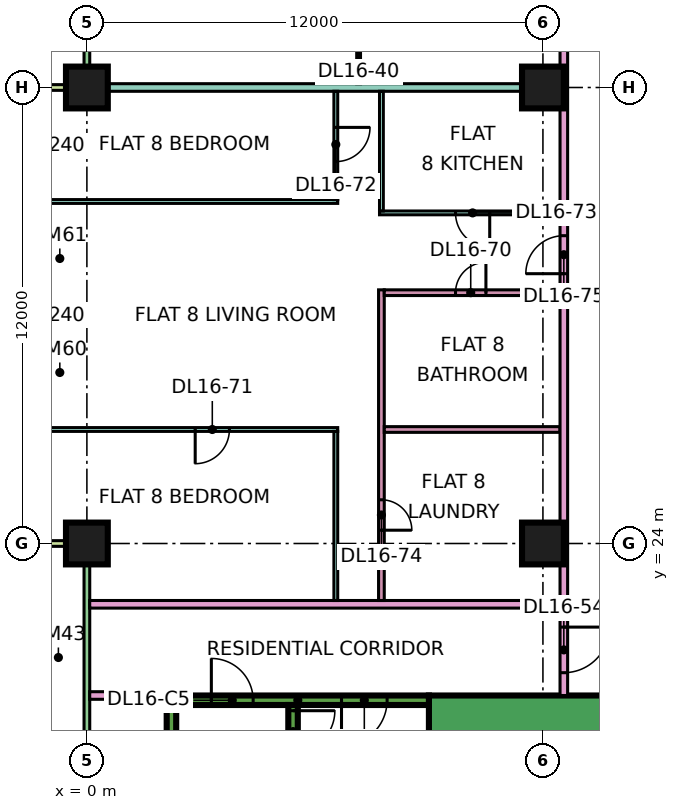
"""IFC4 building model, lengths in metres.
Left out: names, types, materials, properties, quantities, classifications, styles, units other than length and angle.
Written with IfcOpenShell. Run it as: python <this file> out.ifc"""

import sys

from ifc_helpers import new_model, si_unit, direction, frame, frame_2d, origin, origin_2d, place, context, subcontext, project, spatial, rectangle, extrude, element, fill, save


model = new_model("IFC4")
c1 = context("Model", 3, precision=1e-05, world=origin(), true_north=direction((0.0, 1.0)))
c2 = subcontext(c1, "Body", "Model", "MODEL_VIEW")
j1 = project(units=[si_unit("LENGTHUNIT", "METRE"), si_unit("PLANEANGLEUNIT", "RADIAN")], contexts=[c1])
p1 = place(None, origin())
s1 = spatial("IfcSite", under=j1, at=p1, CompositionType="ELEMENT")
p2 = place(p1, origin())
s2 = spatial("IfcBuilding", under=s1, at=p2, CompositionType="ELEMENT")
p3 = place(p2, frame((0.0, 0.0, 75.15)))
s3 = spatial("IfcBuildingStorey", under=s2, at=p3, CompositionType="ELEMENT", Elevation=75.15)
p4 = place(p3, frame((0.0, 24.0, 0.0), z_axis=(0.0, 0.0, 1.0), x_axis=(1.0, 0.0, 0.0)))
e1 = element("IfcColumn", 1, at=p4, inside=s3, PredefinedType="COLUMN", context=c2, shape_type="SweptSolid", body=[
    extrude(rectangle(XDim=1.1, YDim=1.1, at=origin_2d()), origin(), (0.0, 0.0, 1.0), 3.75),
])
p5 = place(p3, frame((0.0, 36.0, 0.0), z_axis=(0.0, 0.0, 1.0), x_axis=(1.0, 0.0, 0.0)))
e2 = element("IfcColumn", 2, at=p5, inside=s3, PredefinedType="COLUMN", context=c2, shape_type="SweptSolid", body=[
    extrude(rectangle(XDim=1.1, YDim=1.1, at=origin_2d()), origin(), (0.0, 0.0, 1.0), 3.75),
])
for number, where, z_axis, x_axis in (
    (3, (12.0, 24.0, 0.0), (0.0, 0.0, 1.0), (1.0, 0.0, 0.0)),
    (4, (12.0, 36.0, 0.0), (0.0, 0.0, 1.0), (1.0, 0.0, 0.0)),
):
    element("IfcColumn", number, at=place(p3, frame(where, z_axis=z_axis, x_axis=x_axis)), inside=s3, PredefinedType="COLUMN", context=c2, shape_type="SweptSolid", body=[
        extrude(rectangle(XDim=1.1, YDim=1.1, at=origin_2d()), origin(), (0.0, 0.0, 1.0), 3.75),
    ])
p6 = place(p3, frame((9.0, 19.45, 0.0), z_axis=(0.0, 0.0, 1.0), x_axis=(1.0, 0.0, 0.0)))
e5 = element("IfcWall", 5, at=p6, inside=s3, PredefinedType="SHEAR", context=c2, shape_type="SweptSolid", body=[
    extrude(rectangle(XDim=25.0, YDim=1.1, at=frame_2d((12.5, 0.0))), origin(), (0.0, 0.0, 1.0), 3.75),
])
p7 = place(p6, frame((19.1, 0.0, 0.0)))
e6 = element("IfcOpeningElement", 6, at=p7, cuts=e5, PredefinedType="OPENING", context=c2, shape_type="SweptSolid", body=[
    extrude(rectangle(XDim=1.8, YDim=2.4, at=frame_2d((0.9, 1.2))), frame((0.0, 0.56, 0.0), z_axis=(0.0, -1.0, 0.0), x_axis=(1.0, 0.0, 0.0)), (0.0, 0.0, 1.0), 1.12),
])
p8 = place(p3, frame((2.1, 19.875, 0.0), z_axis=(0.0, 0.0, 1.0), x_axis=(1.0, 0.0, 0.0)))
e7 = element("IfcWall", 7, at=p8, inside=s3, PredefinedType="SHEAR", context=c2, shape_type="SweptSolid", body=[
    extrude(rectangle(XDim=6.9, YDim=0.25, at=frame_2d((3.45, 0.0))), origin(), (0.0, 0.0, 1.0), 3.75),
])
p9 = place(p8, frame((1.175, 0.0, 0.0)))
e8 = element("IfcOpeningElement", 8, at=p9, cuts=e7, PredefinedType="OPENING", context=c2, shape_type="SweptSolid", body=[
    extrude(rectangle(XDim=1.1, YDim=2.2, at=frame_2d((0.55, 1.1))), frame((0.0, 0.135, 0.0), z_axis=(0.0, -1.0, 0.0), x_axis=(1.0, 0.0, 0.0)), (0.0, 0.0, 1.0), 0.27),
])
p10 = place(p8, frame((4.6, 0.0, 0.0)))
e9 = element("IfcOpeningElement", 9, at=p10, cuts=e7, PredefinedType="OPENING", context=c2, shape_type="SweptSolid", body=[
    extrude(rectangle(XDim=1.2, YDim=2.2, at=frame_2d((0.6, 1.1))), frame((0.0, 0.135, 0.0), z_axis=(0.0, -1.0, 0.0), x_axis=(1.0, 0.0, 0.0)), (0.0, 0.0, 1.0), 0.27),
])
p11 = place(p3, frame((2.225, 13.25, 0.0), z_axis=(0.0, 0.0, 1.0), x_axis=(0.0, 1.0, 0.0)))
e10 = element("IfcWall", 10, at=p11, inside=s3, PredefinedType="SHEAR", context=c2, shape_type="SweptSolid", body=[
    extrude(rectangle(XDim=6.5, YDim=0.25, at=frame_2d((3.25, 0.0))), origin(), (0.0, 0.0, 1.0), 3.75),
])
p12 = place(p3, frame((5.425, 13.25, 0.0), z_axis=(0.0, 0.0, 1.0), x_axis=(0.0, 1.0, 0.0)))
e11 = element("IfcWall", 11, at=p12, inside=s3, PredefinedType="SHEAR", context=c2, shape_type="SweptSolid", body=[
    extrude(rectangle(XDim=6.5, YDim=0.25, at=frame_2d((3.25, 0.0))), origin(), (0.0, 0.0, 1.0), 3.75),
])
p13 = place(p12, frame((5.25, 0.0, 0.0)))
e12 = element("IfcOpeningElement", 12, at=p13, cuts=e11, PredefinedType="OPENING", context=c2, shape_type="SweptSolid", body=[
    extrude(rectangle(XDim=1.1, YDim=2.2, at=frame_2d((0.55, 1.1))), frame((0.0, 0.135, 0.0), z_axis=(0.0, -1.0, 0.0), x_axis=(1.0, 0.0, 0.0)), (0.0, 0.0, 1.0), 0.27),
])
p14 = place(p3, frame((0.0, 47.925, 0.0), z_axis=(0.0, 0.0, 1.0), x_axis=(0.0, -1.0, 0.0)))
e13 = element("IfcWall", 13, at=p14, inside=s3, PredefinedType="SOLIDWALL", context=c2, shape_type="SweptSolid", body=[
    extrude(rectangle(XDim=11.85, YDim=0.15, at=frame_2d((5.925, 0.0))), origin(), (0.0, 0.0, 1.0), 3.35),
])
p15 = place(p14, frame((0.538, 0.0, 0.45)))
e14 = element("IfcOpeningElement", 14, at=p15, cuts=e13, PredefinedType="OPENING", context=c2, shape_type="SweptSolid", body=[
    extrude(rectangle(XDim=1.2, YDim=2.4, at=frame_2d((0.6, 1.2))), frame((0.0, 0.085, 0.0), z_axis=(0.0, -1.0, 0.0), x_axis=(1.0, 0.0, 0.0)), (0.0, 0.0, 1.0), 0.17),
])
p16 = place(p14, frame((4.15, 0.0, 0.45)))
e15 = element("IfcOpeningElement", 15, at=p16, cuts=e13, PredefinedType="OPENING", context=c2, shape_type="SweptSolid", body=[
    extrude(rectangle(XDim=1.2, YDim=2.4, at=frame_2d((0.6, 1.2))), frame((0.0, 0.085, 0.0), z_axis=(0.0, -1.0, 0.0), x_axis=(1.0, 0.0, 0.0)), (0.0, 0.0, 1.0), 0.17),
])
p17 = place(p14, frame((6.525, 0.0, 0.0)))
e16 = element("IfcOpeningElement", 16, at=p17, cuts=e13, PredefinedType="OPENING", context=c2, shape_type="SweptSolid", body=[
    extrude(rectangle(XDim=1.8, YDim=2.4, at=frame_2d((0.9, 1.2))), frame((0.0, 0.085, 0.0), z_axis=(0.0, -1.0, 0.0), x_axis=(1.0, 0.0, 0.0)), (0.0, 0.0, 1.0), 0.17),
])
p18 = place(p14, frame((9.5, 0.0, 0.45)))
e17 = element("IfcOpeningElement", 17, at=p18, cuts=e13, PredefinedType="OPENING", context=c2, shape_type="SweptSolid", body=[
    extrude(rectangle(XDim=1.2, YDim=2.4, at=frame_2d((0.6, 1.2))), frame((0.0, 0.085, 0.0), z_axis=(0.0, -1.0, 0.0), x_axis=(1.0, 0.0, 0.0)), (0.0, 0.0, 1.0), 0.17),
])
p19 = place(p3, frame((-1.5, 36.0, 0.0), z_axis=(0.0, 0.0, 1.0), x_axis=(1.0, 0.0, 0.0)))
e18 = element("IfcWall", 18, at=p19, inside=s3, PredefinedType="SOLIDWALL", context=c2, shape_type="SweptSolid", body=[
    extrude(rectangle(XDim=1.5, YDim=0.15, at=frame_2d((0.75, 0.0))), origin(), (0.0, 0.0, 1.0), 3.35),
])
p20 = place(p3, frame((0.0, 23.925, 0.0), z_axis=(0.0, 0.0, 1.0), x_axis=(0.0, -1.0, 0.0)))
e19 = element("IfcWall", 19, at=p20, inside=s3, PredefinedType="SOLIDWALL", context=c2, shape_type="SweptSolid", body=[
    extrude(rectangle(XDim=11.35, YDim=0.15, at=frame_2d((5.675, 0.0))), origin(), (0.0, 0.0, 1.0), 3.35),
])
p21 = place(p20, frame((6.738, 0.0, 0.0)))
e20 = element("IfcOpeningElement", 20, at=p21, cuts=e19, PredefinedType="OPENING", context=c2, shape_type="SweptSolid", body=[
    extrude(rectangle(XDim=1.8, YDim=2.4, at=frame_2d((0.9, 1.2))), frame((0.0, 0.085, 0.0), z_axis=(0.0, -1.0, 0.0), x_axis=(1.0, 0.0, 0.0)), (0.0, 0.0, 1.0), 0.17),
])
p22 = place(p3, frame((-1.5, 24.0, 0.0), z_axis=(0.0, 0.0, 1.0), x_axis=(1.0, 0.0, 0.0)))
e21 = element("IfcWall", 21, at=p22, inside=s3, PredefinedType="SOLIDWALL", context=c2, shape_type="SweptSolid", body=[
    extrude(rectangle(XDim=1.5, YDim=0.15, at=frame_2d((0.75, 0.0))), origin(), (0.0, 0.0, 1.0), 3.35),
])
p23 = place(p3, frame((-1.35, 27.0, 0.0), z_axis=(0.0, 0.0, 1.0), x_axis=(1.0, 0.0, 0.0)))
e22 = element("IfcWall", 22, at=p23, inside=s3, PredefinedType="PARTITIONING", context=c2, shape_type="SweptSolid", body=[
    extrude(rectangle(XDim=7.95, YDim=0.1, at=frame_2d((3.975, 0.0))), origin(), (0.0, 0.0, 1.0), 3.35),
])
p24 = place(p23, frame((4.2, 0.0, 0.0)))
e23 = element("IfcOpeningElement", 23, at=p24, cuts=e22, PredefinedType="OPENING", context=c2, shape_type="SweptSolid", body=[
    extrude(rectangle(XDim=0.9, YDim=2.1, at=frame_2d((0.45, 1.05))), frame((0.0, 0.06, 0.0), z_axis=(0.0, -1.0, 0.0), x_axis=(1.0, 0.0, 0.0)), (0.0, 0.0, 1.0), 0.12),
])
p25 = place(p3, frame((-1.35, 33.0, 0.0), z_axis=(0.0, 0.0, 1.0), x_axis=(1.0, 0.0, 0.0)))
e24 = element("IfcWall", 24, at=p25, inside=s3, PredefinedType="PARTITIONING", context=c2, shape_type="SweptSolid", body=[
    extrude(rectangle(XDim=7.95, YDim=0.1, at=frame_2d((3.975, 0.0))), origin(), (0.0, 0.0, 1.0), 3.35),
])
e25 = element("IfcWall", 25, at=p5, inside=s3, PredefinedType="PARTITIONING", context=c2, shape_type="SweptSolid", body=[
    extrude(rectangle(XDim=12.45, YDim=0.2, at=frame_2d((6.225, 0.0))), origin(), (0.0, 0.0, 1.0), 3.35),
])
p26 = place(p3, frame((0.074, 20.0, 0.0), z_axis=(0.0, 0.0, 1.0), x_axis=(1.0, 0.0, 0.0)))
e26 = element("IfcWall", 26, at=p26, inside=s3, PredefinedType="PARTITIONING", context=c2, shape_type="SweptSolid", body=[
    extrude(rectangle(XDim=2.026, YDim=0.2, at=frame_2d((1.013, 0.0))), origin(), (0.0, 0.0, 1.0), 3.35),
])
p27 = place(p3, frame((0.074, 22.4, 0.0), z_axis=(0.0, 0.0, 1.0), x_axis=(1.0, 0.0, 0.0)))
e27 = element("IfcWall", 27, at=p27, inside=s3, PredefinedType="PARTITIONING", context=c2, shape_type="SweptSolid", body=[
    extrude(rectangle(XDim=12.376, YDim=0.2, at=frame_2d((6.188, 0.0))), origin(), (0.0, 0.0, 1.0), 3.35),
])
p28 = place(p3, frame((6.55, 22.5, 0.0), z_axis=(0.0, 0.0, 1.0), x_axis=(0.0, 1.0, 0.0)))
e28 = element("IfcWall", 28, at=p28, inside=s3, PredefinedType="PARTITIONING", context=c2, shape_type="SweptSolid", body=[
    extrude(rectangle(XDim=4.45, YDim=0.1, at=frame_2d((2.225, 0.0))), origin(), (0.0, 0.0, 1.0), 3.35),
])
p29 = place(p3, frame((6.55, 33.05, 0.0), z_axis=(0.0, 0.0, 1.0), x_axis=(0.0, 1.0, 0.0)))
e29 = element("IfcWall", 29, at=p29, inside=s3, PredefinedType="PARTITIONING", context=c2, shape_type="SweptSolid", body=[
    extrude(rectangle(XDim=2.85, YDim=0.1, at=frame_2d((1.425, 0.0))), origin(), (0.0, 0.0, 1.0), 3.35),
])
p30 = place(p29, frame((1.0, 0.0, 0.0)))
e30 = element("IfcOpeningElement", 30, at=p30, cuts=e29, PredefinedType="OPENING", context=c2, shape_type="SweptSolid", body=[
    extrude(rectangle(XDim=0.9, YDim=2.1, at=frame_2d((0.45, 1.05))), frame((0.0, 0.06, 0.0), z_axis=(0.0, -1.0, 0.0), x_axis=(1.0, 0.0, 0.0)), (0.0, 0.0, 1.0), 0.12),
])
p31 = place(p3, frame((7.15, 36.1, 0.0), z_axis=(0.0, 0.0, 1.0), x_axis=(0.0, 1.0, 0.0)))
e31 = element("IfcWall", 31, at=p31, inside=s3, PredefinedType="PARTITIONING", context=c2, shape_type="SweptSolid", body=[
    extrude(rectangle(XDim=2.85, YDim=0.1, at=frame_2d((1.425, 0.0))), origin(), (0.0, 0.0, 1.0), 3.35),
])
p32 = place(p31, frame((0.95, 0.0, 0.0)))
e32 = element("IfcOpeningElement", 32, at=p32, cuts=e31, PredefinedType="OPENING", context=c2, shape_type="SweptSolid", body=[
    extrude(rectangle(XDim=0.9, YDim=2.1, at=frame_2d((0.45, 1.05))), frame((0.0, 0.06, 0.0), z_axis=(0.0, -1.0, 0.0), x_axis=(1.0, 0.0, 0.0)), (0.0, 0.0, 1.0), 0.12),
])
p33 = place(p3, frame((7.7, 32.7, 0.0), z_axis=(0.0, 0.0, 1.0), x_axis=(1.0, 0.0, 0.0)))
e33 = element("IfcWall", 33, at=p33, inside=s3, PredefinedType="PARTITIONING", context=c2, shape_type="SweptSolid", body=[
    extrude(rectangle(XDim=4.75, YDim=0.1, at=frame_2d((2.375, 0.0))), origin(), (0.0, 0.0, 1.0), 3.35),
])
p34 = place(p33, frame((2.0, 0.0, 0.0)))
e34 = element("IfcOpeningElement", 34, at=p34, cuts=e33, PredefinedType="OPENING", context=c2, shape_type="SweptSolid", body=[
    extrude(rectangle(XDim=0.9, YDim=2.1, at=frame_2d((0.45, 1.05))), frame((0.0, 0.06, 0.0), z_axis=(0.0, -1.0, 0.0), x_axis=(1.0, 0.0, 0.0)), (0.0, 0.0, 1.0), 0.12),
])
p35 = place(p3, frame((7.75, 22.5, 0.0), z_axis=(0.0, 0.0, 1.0), x_axis=(0.0, 1.0, 0.0)))
e35 = element("IfcWall", 35, at=p35, inside=s3, PredefinedType="PARTITIONING", context=c2, shape_type="SweptSolid", body=[
    extrude(rectangle(XDim=8.175, YDim=0.15, at=frame_2d((4.087, 0.0))), origin(), (0.0, 0.0, 1.0), 3.35),
])
p36 = place(p35, frame((1.85, 0.0, 0.0)))
e36 = element("IfcOpeningElement", 36, at=p36, cuts=e35, PredefinedType="OPENING", context=c2, shape_type="SweptSolid", body=[
    extrude(rectangle(XDim=0.8, YDim=2.1, at=frame_2d((0.4, 1.05))), frame((0.0, 0.085, 0.0), z_axis=(0.0, -1.0, 0.0), x_axis=(1.0, 0.0, 0.0)), (0.0, 0.0, 1.0), 0.17),
])
p37 = place(p3, frame((7.75, 32.75, 0.0), z_axis=(0.0, 0.0, 1.0), x_axis=(0.0, 1.0, 0.0)))
e37 = element("IfcWall", 37, at=p37, inside=s3, PredefinedType="PARTITIONING", context=c2, shape_type="SweptSolid", body=[
    extrude(rectangle(XDim=3.15, YDim=0.1, at=frame_2d((1.575, 0.0))), origin(), (0.0, 0.0, 1.0), 3.35),
])
p38 = place(p3, frame((7.825, 27.0, 0.0), z_axis=(0.0, 0.0, 1.0), x_axis=(1.0, 0.0, 0.0)))
e38 = element("IfcWall", 38, at=p38, inside=s3, PredefinedType="PARTITIONING", context=c2, shape_type="SweptSolid", body=[
    extrude(rectangle(XDim=4.625, YDim=0.15, at=frame_2d((2.312, 0.0))), origin(), (0.0, 0.0, 1.0), 3.35),
])
p39 = place(p3, frame((7.825, 30.6, 0.0), z_axis=(0.0, 0.0, 1.0), x_axis=(1.0, 0.0, 0.0)))
e39 = element("IfcWall", 39, at=p39, inside=s3, PredefinedType="PARTITIONING", context=c2, shape_type="SweptSolid", body=[
    extrude(rectangle(XDim=4.625, YDim=0.15, at=frame_2d((2.312, 0.0))), origin(), (0.0, 0.0, 1.0), 3.35),
])
p40 = place(p39, frame((1.875, 0.0, 0.0)))
e40 = element("IfcOpeningElement", 40, at=p40, cuts=e39, PredefinedType="OPENING", context=c2, shape_type="SweptSolid", body=[
    extrude(rectangle(XDim=0.8, YDim=2.1, at=frame_2d((0.4, 1.05))), frame((0.0, 0.085, 0.0), z_axis=(0.0, -1.0, 0.0), x_axis=(1.0, 0.0, 0.0)), (0.0, 0.0, 1.0), 0.17),
])
p41 = place(p3, frame((12.55, 20.0, 0.0), z_axis=(0.0, 0.0, 1.0), x_axis=(0.0, 1.0, 0.0)))
e41 = element("IfcWall", 41, at=p41, inside=s3, PredefinedType="PARTITIONING", context=c2, shape_type="SweptSolid", body=[
    extrude(rectangle(XDim=42.926, YDim=0.2, at=frame_2d((21.463, 0.0))), origin(), (0.0, 0.0, 1.0), 3.35),
])
p42 = place(p41, frame((17.1, 0.0, 0.0)))
e42 = element("IfcOpeningElement", 42, at=p42, cuts=e41, PredefinedType="OPENING", context=c2, shape_type="SweptSolid", body=[
    extrude(rectangle(XDim=1.0, YDim=2.1, at=frame_2d((0.5, 1.05))), frame((0.0, 0.11, 0.0), z_axis=(0.0, -1.0, 0.0), x_axis=(1.0, 0.0, 0.0)), (0.0, 0.0, 1.0), 0.22),
])
p43 = place(p41, frame((28.95, 0.0, 0.0)))
e43 = element("IfcOpeningElement", 43, at=p43, cuts=e41, PredefinedType="OPENING", context=c2, shape_type="SweptSolid", body=[
    extrude(rectangle(XDim=1.0, YDim=2.1, at=frame_2d((0.5, 1.05))), frame((0.0, 0.11, 0.0), z_axis=(0.0, -1.0, 0.0), x_axis=(1.0, 0.0, 0.0)), (0.0, 0.0, 1.0), 0.22),
])
p44 = place(p41, frame((0.6, 0.0, 0.0)))
e44 = element("IfcOpeningElement", 44, at=p44, cuts=e41, PredefinedType="OPENING", context=c2, shape_type="SweptSolid", body=[
    extrude(rectangle(XDim=1.2, YDim=2.1, at=frame_2d((0.6, 1.05))), frame((0.0, 0.11, 0.0), z_axis=(0.0, -1.0, 0.0), x_axis=(1.0, 0.0, 0.0)), (0.0, 0.0, 1.0), 0.22),
])
p45 = place(p41, frame((11.1, 0.0, 0.0)))
e45 = element("IfcOpeningElement", 45, at=p45, cuts=e41, PredefinedType="OPENING", context=c2, shape_type="SweptSolid", body=[
    extrude(rectangle(XDim=1.0, YDim=2.1, at=frame_2d((0.5, 1.05))), frame((0.0, 0.11, 0.0), z_axis=(0.0, -1.0, 0.0), x_axis=(1.0, 0.0, 0.0)), (0.0, 0.0, 1.0), 0.22),
])
p46 = place(p13, origin())
e46 = element("IfcDoor", 46, at=p46, inside=s3, OperationType="SINGLE_SWING_RIGHT", PredefinedType="DOOR", context=c2, shape_type="SweptSolid", body=[
    extrude(rectangle(XDim=1.1, YDim=2.2, at=frame_2d((0.55, 1.1))), frame((0.0, 0.025, 0.0), z_axis=(0.0, -1.0, 0.0), x_axis=(1.0, 0.0, 0.0)), (0.0, 0.0, 1.0), 0.05),
])
fill(e12, e46)
p47 = place(p9, origin())
e47 = element("IfcDoor", 47, at=p47, inside=s3, OperationType="SINGLE_SWING_LEFT", PredefinedType="DOOR", context=c2, shape_type="SweptSolid", body=[
    extrude(rectangle(XDim=1.1, YDim=2.2, at=frame_2d((0.55, 1.1))), frame((0.0, 0.025, 0.0), z_axis=(0.0, -1.0, 0.0), x_axis=(1.0, 0.0, 0.0)), (0.0, 0.0, 1.0), 0.05),
])
fill(e8, e47)
p48 = place(p10, frame((1.2, 0.0, 0.0), z_axis=(0.0, 0.0, 1.0), x_axis=(-1.0, 0.0, 0.0)))
e48 = element("IfcDoor", 48, at=p48, inside=s3, OperationType="SINGLE_SWING_LEFT", PredefinedType="DOOR", context=c2, shape_type="SweptSolid", body=[
    extrude(rectangle(XDim=1.2, YDim=2.2, at=frame_2d((0.6, 1.1))), frame((0.0, 0.025, 0.0), z_axis=(0.0, -1.0, 0.0), x_axis=(1.0, 0.0, 0.0)), (0.0, 0.0, 1.0), 0.05),
])
fill(e9, e48)
p49 = place(p44, origin())
e49 = element("IfcDoor", 49, at=p49, inside=s3, OperationType="SINGLE_SWING_RIGHT", PredefinedType="DOOR", context=c2, shape_type="SweptSolid", body=[
    extrude(rectangle(XDim=1.2, YDim=2.1, at=frame_2d((0.6, 1.05))), frame((0.0, 0.025, 0.0), z_axis=(0.0, -1.0, 0.0), x_axis=(1.0, 0.0, 0.0)), (0.0, 0.0, 1.0), 0.05),
])
fill(e44, e49)
p50 = place(p40, frame((0.8, 0.0, 0.0), z_axis=(0.0, 0.0, 1.0), x_axis=(-1.0, 0.0, 0.0)))
e50 = element("IfcDoor", 50, at=p50, inside=s3, OperationType="SINGLE_SWING_RIGHT", PredefinedType="DOOR", context=c2, shape_type="SweptSolid", body=[
    extrude(rectangle(XDim=0.8, YDim=2.1, at=frame_2d((0.4, 1.05))), frame((0.0, 0.025, 0.0), z_axis=(0.0, -1.0, 0.0), x_axis=(1.0, 0.0, 0.0)), (0.0, 0.0, 1.0), 0.05),
])
fill(e40, e50)
p51 = place(p24, frame((0.9, 0.0, 0.0), z_axis=(0.0, 0.0, 1.0), x_axis=(-1.0, 0.0, 0.0)))
e51 = element("IfcDoor", 51, at=p51, inside=s3, OperationType="SINGLE_SWING_LEFT", PredefinedType="DOOR", context=c2, shape_type="SweptSolid", body=[
    extrude(rectangle(XDim=0.9, YDim=2.1, at=frame_2d((0.45, 1.05))), frame((0.0, 0.025, 0.0), z_axis=(0.0, -1.0, 0.0), x_axis=(1.0, 0.0, 0.0)), (0.0, 0.0, 1.0), 0.05),
])
fill(e23, e51)
p52 = place(p30, origin())
e52 = element("IfcDoor", 52, at=p52, inside=s3, OperationType="SINGLE_SWING_RIGHT", PredefinedType="DOOR", context=c2, shape_type="SweptSolid", body=[
    extrude(rectangle(XDim=0.9, YDim=2.1, at=frame_2d((0.45, 1.05))), frame((0.0, 0.025, 0.0), z_axis=(0.0, -1.0, 0.0), x_axis=(1.0, 0.0, 0.0)), (0.0, 0.0, 1.0), 0.05),
])
fill(e30, e52)
p53 = place(p34, origin())
e53 = element("IfcDoor", 53, at=p53, inside=s3, OperationType="SINGLE_SWING_RIGHT", PredefinedType="DOOR", context=c2, shape_type="SweptSolid", body=[
    extrude(rectangle(XDim=0.9, YDim=2.1, at=frame_2d((0.45, 1.05))), frame((0.0, 0.025, 0.0), z_axis=(0.0, -1.0, 0.0), x_axis=(1.0, 0.0, 0.0)), (0.0, 0.0, 1.0), 0.05),
])
fill(e34, e53)
p54 = place(p36, frame((0.8, 0.0, 0.0), z_axis=(0.0, 0.0, 1.0), x_axis=(-1.0, 0.0, 0.0)))
e54 = element("IfcDoor", 54, at=p54, inside=s3, OperationType="SINGLE_SWING_LEFT", PredefinedType="DOOR", context=c2, shape_type="SweptSolid", body=[
    extrude(rectangle(XDim=0.8, YDim=2.1, at=frame_2d((0.4, 1.05))), frame((0.0, 0.025, 0.0), z_axis=(0.0, -1.0, 0.0), x_axis=(1.0, 0.0, 0.0)), (0.0, 0.0, 1.0), 0.05),
])
fill(e36, e54)
p55 = place(p45, origin())
e55 = element("IfcDoor", 55, at=p55, inside=s3, OperationType="SINGLE_SWING_LEFT", PredefinedType="DOOR", context=c2, shape_type="SweptSolid", body=[
    extrude(rectangle(XDim=1.0, YDim=2.1, at=frame_2d((0.5, 1.05))), frame((0.0, 0.025, 0.0), z_axis=(0.0, -1.0, 0.0), x_axis=(1.0, 0.0, 0.0)), (0.0, 0.0, 1.0), 0.05),
])
fill(e45, e55)
save(model, sys.argv[1])
